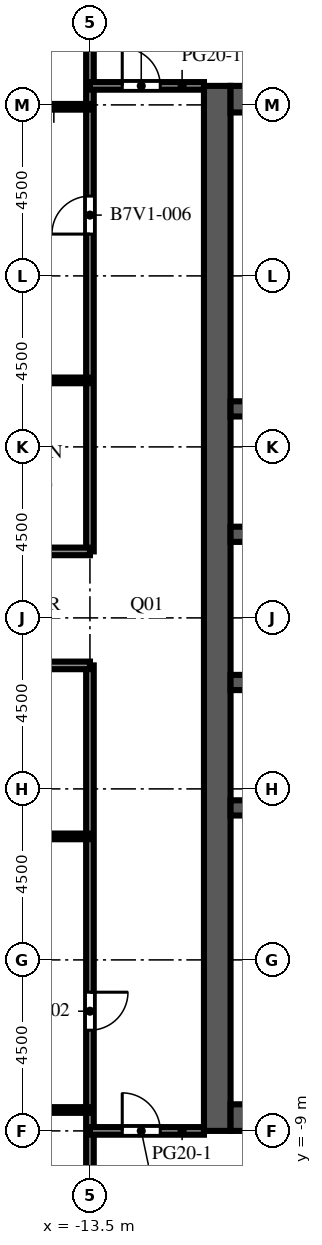
"""IFC4 building model, lengths in metres.
Left out: names, types, materials, properties, quantities, classifications, styles, units other than length and angle.
Written with IfcOpenShell. Run it as: python <this file> out.ifc"""

import sys

from ifc_helpers import new_model, si_unit, direction, frame, frame_2d, origin, place, context, subcontext, project, spatial, rectangle, extrude, element, fill, save


model = new_model("IFC4")
c1 = context("Model", 3, precision=1e-05, world=origin(), true_north=direction((0.0, 1.0)))
c2 = subcontext(c1, "Body", "Model", "MODEL_VIEW")
j1 = project(units=[si_unit("LENGTHUNIT", "METRE"), si_unit("PLANEANGLEUNIT", "RADIAN")], contexts=[c1])
p1 = place(None, origin())
s1 = spatial("IfcSite", under=j1, at=p1, CompositionType="ELEMENT")
p2 = place(p1, origin())
s2 = spatial("IfcBuilding", under=s1, at=p2, CompositionType="ELEMENT")
p3 = place(p2, frame((0.0, 0.0, 243.9)))
s3 = spatial("IfcBuildingStorey", under=s2, at=p3, CompositionType="ELEMENT", Elevation=243.9)
p4 = place(p3, frame((-10.15, -9.0, 0.0), z_axis=(0.0, 0.0, 1.0), x_axis=(0.0, 1.0, 0.0)))
e1 = element("IfcWall", 1, at=p4, inside=s3, PredefinedType="SHEAR", context=c2, shape_type="SweptSolid", body=[
    extrude(rectangle(XDim=27.5, YDim=0.7, at=frame_2d((13.75, 0.0))), origin(), (0.0, 0.0, 1.0), 4.1),
])
p5 = place(p4, frame((12.55, 0.0, 0.0)))
e2 = element("IfcOpeningElement", 2, at=p5, cuts=e1, PredefinedType="OPENING", context=c2, shape_type="SweptSolid", body=[
    extrude(rectangle(XDim=2.4, YDim=2.4, at=frame_2d((1.2, 1.2))), frame((0.0, 0.36, 0.0), z_axis=(0.0, -1.0, 0.0), x_axis=(1.0, 0.0, 0.0)), (0.0, 0.0, 1.0), 0.72),
])
p6 = place(p4, frame((6.825, 0.0, 0.0)))
e3 = element("IfcOpeningElement", 3, at=p6, cuts=e1, PredefinedType="OPENING", context=c2, shape_type="SweptSolid", body=[
    extrude(rectangle(XDim=1.2, YDim=2.1, at=frame_2d((0.6, 1.05))), frame((0.0, 0.36, 0.0), z_axis=(0.0, -1.0, 0.0), x_axis=(1.0, 0.0, 0.0)), (0.0, 0.0, 1.0), 0.72),
])
p7 = place(p4, frame((19.475, 0.0, 0.0)))
e4 = element("IfcOpeningElement", 4, at=p7, cuts=e1, PredefinedType="OPENING", context=c2, shape_type="SweptSolid", body=[
    extrude(rectangle(XDim=1.2, YDim=2.1, at=frame_2d((0.6, 1.05))), frame((0.0, 0.36, 0.0), z_axis=(0.0, -1.0, 0.0), x_axis=(1.0, 0.0, 0.0)), (0.0, 0.0, 1.0), 0.72),
])
for number, where, z_axis, x_axis in (
    (5, (-9.8, -8.65, 0.0), (0.0, 0.0, 1.0), (1.0, 0.0, 0.0)),
    (6, (-9.8, 18.15, 0.0), (0.0, 0.0, 1.0), (1.0, 0.0, 0.0)),
):
    element("IfcWall", number, at=place(p3, frame(where, z_axis=z_axis, x_axis=x_axis)), inside=s3, PredefinedType="SHEAR", context=c2, shape_type="SweptSolid", body=[
        extrude(rectangle(XDim=10.6, YDim=0.7, at=frame_2d((5.3, 0.0))), origin(), (0.0, 0.0, 1.0), 4.1),
    ])
p8 = place(p3, frame((-9.8, -0.5, 0.0), z_axis=(0.0, 0.0, 1.0), x_axis=(1.0, 0.0, 0.0)))
e7 = element("IfcWall", 7, at=p8, inside=s3, PredefinedType="SHEAR", context=c2, shape_type="SweptSolid", body=[
    extrude(rectangle(XDim=10.6, YDim=0.4, at=frame_2d((5.3, 0.0))), origin(), (0.0, 0.0, 1.0), 4.1),
])
p9 = place(p3, frame((-9.8, 2.8, 0.0), z_axis=(0.0, 0.0, 1.0), x_axis=(1.0, 0.0, 0.0)))
e8 = element("IfcWall", 8, at=p9, inside=s3, PredefinedType="SHEAR", context=c2, shape_type="SweptSolid", body=[
    extrude(rectangle(XDim=10.6, YDim=0.4, at=frame_2d((5.3, 0.0))), origin(), (0.0, 0.0, 1.0), 4.1),
])
p10 = place(p9, frame((0.688, 0.0, 0.0)))
e9 = element("IfcOpeningElement", 9, at=p10, cuts=e8, PredefinedType="OPENING", context=c2, shape_type="SweptSolid", body=[
    extrude(rectangle(XDim=1.1, YDim=2.1, at=frame_2d((0.55, 1.05))), frame((0.0, 0.21, 0.0), z_axis=(0.0, -1.0, 0.0), x_axis=(1.0, 0.0, 0.0)), (0.0, 0.0, 1.0), 0.42),
])
p11 = place(p9, frame((3.438, 0.0, 0.0)))
e10 = element("IfcOpeningElement", 10, at=p11, cuts=e8, PredefinedType="OPENING", context=c2, shape_type="SweptSolid", body=[
    extrude(rectangle(XDim=1.1, YDim=2.1, at=frame_2d((0.55, 1.05))), frame((0.0, 0.21, 0.0), z_axis=(0.0, -1.0, 0.0), x_axis=(1.0, 0.0, 0.0)), (0.0, 0.0, 1.0), 0.42),
])
p12 = place(p9, frame((6.113, 0.0, 0.0)))
e11 = element("IfcOpeningElement", 11, at=p12, cuts=e8, PredefinedType="OPENING", context=c2, shape_type="SweptSolid", body=[
    extrude(rectangle(XDim=1.0, YDim=2.1, at=frame_2d((0.5, 1.05))), frame((0.0, 0.21, 0.0), z_axis=(0.0, -1.0, 0.0), x_axis=(1.0, 0.0, 0.0)), (0.0, 0.0, 1.0), 0.42),
])
p13 = place(p9, frame((8.863, 0.0, 0.0)))
e12 = element("IfcOpeningElement", 12, at=p13, cuts=e8, PredefinedType="OPENING", context=c2, shape_type="SweptSolid", body=[
    extrude(rectangle(XDim=1.0, YDim=2.1, at=frame_2d((0.5, 1.05))), frame((0.0, 0.21, 0.0), z_axis=(0.0, -1.0, 0.0), x_axis=(1.0, 0.0, 0.0)), (0.0, 0.0, 1.0), 0.42),
])
p14 = place(p3, frame((-9.8, 6.7, 0.0), z_axis=(0.0, 0.0, 1.0), x_axis=(1.0, 0.0, 0.0)))
e13 = element("IfcWall", 13, at=p14, inside=s3, PredefinedType="SHEAR", context=c2, shape_type="SweptSolid", body=[
    extrude(rectangle(XDim=10.6, YDim=0.4, at=frame_2d((5.3, 0.0))), origin(), (0.0, 0.0, 1.0), 4.1),
])
p15 = place(p14, frame((3.438, 0.0, 0.0)))
e14 = element("IfcOpeningElement", 14, at=p15, cuts=e13, PredefinedType="OPENING", context=c2, shape_type="SweptSolid", body=[
    extrude(rectangle(XDim=1.1, YDim=2.1, at=frame_2d((0.55, 1.05))), frame((0.0, 0.21, 0.0), z_axis=(0.0, -1.0, 0.0), x_axis=(1.0, 0.0, 0.0)), (0.0, 0.0, 1.0), 0.42),
])
p16 = place(p14, frame((6.062, 0.0, 0.0)))
e15 = element("IfcOpeningElement", 15, at=p16, cuts=e13, PredefinedType="OPENING", context=c2, shape_type="SweptSolid", body=[
    extrude(rectangle(XDim=1.1, YDim=2.1, at=frame_2d((0.55, 1.05))), frame((0.0, 0.21, 0.0), z_axis=(0.0, -1.0, 0.0), x_axis=(1.0, 0.0, 0.0)), (0.0, 0.0, 1.0), 0.42),
])
p17 = place(p14, frame((8.812, 0.0, 0.0)))
e16 = element("IfcOpeningElement", 16, at=p17, cuts=e13, PredefinedType="OPENING", context=c2, shape_type="SweptSolid", body=[
    extrude(rectangle(XDim=1.1, YDim=2.1, at=frame_2d((0.55, 1.05))), frame((0.0, 0.21, 0.0), z_axis=(0.0, -1.0, 0.0), x_axis=(1.0, 0.0, 0.0)), (0.0, 0.0, 1.0), 0.42),
])
p18 = place(p14, frame((0.738, 0.0, 0.0)))
e17 = element("IfcOpeningElement", 17, at=p18, cuts=e13, PredefinedType="OPENING", context=c2, shape_type="SweptSolid", body=[
    extrude(rectangle(XDim=1.0, YDim=2.1, at=frame_2d((0.5, 1.05))), frame((0.0, 0.21, 0.0), z_axis=(0.0, -1.0, 0.0), x_axis=(1.0, 0.0, 0.0)), (0.0, 0.0, 1.0), 0.42),
])
p19 = place(p3, frame((-9.8, 10.0, 0.0), z_axis=(0.0, 0.0, 1.0), x_axis=(1.0, 0.0, 0.0)))
e18 = element("IfcWall", 18, at=p19, inside=s3, PredefinedType="SHEAR", context=c2, shape_type="SweptSolid", body=[
    extrude(rectangle(XDim=10.6, YDim=0.4, at=frame_2d((5.3, 0.0))), origin(), (0.0, 0.0, 1.0), 4.1),
])
p20 = place(p3, frame((-13.5, -22.077, 0.0), z_axis=(0.0, 0.0, 1.0), x_axis=(0.0, 1.0, 0.0)))
e19 = element("IfcWall", 19, at=p20, inside=s3, PredefinedType="PARTITIONING", context=c2, shape_type="SweptSolid", body=[
    extrude(rectangle(XDim=25.327, YDim=0.2, at=frame_2d((12.664, 0.0))), origin(), (0.0, 0.0, 1.0), 3.65),
])
p21 = place(p20, frame((15.727, 0.0, 0.0)))
e20 = element("IfcOpeningElement", 20, at=p21, cuts=e19, PredefinedType="OPENING", context=c2, shape_type="SweptSolid", body=[
    extrude(rectangle(XDim=1.0, YDim=2.1, at=frame_2d((0.5, 1.05))), frame((0.0, 0.11, 0.0), z_axis=(0.0, -1.0, 0.0), x_axis=(1.0, 0.0, 0.0)), (0.0, 0.0, 1.0), 0.22),
])
p22 = place(p3, frame((-13.5, 6.25, 0.0), z_axis=(0.0, 0.0, 1.0), x_axis=(0.0, 1.0, 0.0)))
e21 = element("IfcWall", 21, at=p22, inside=s3, PredefinedType="PARTITIONING", context=c2, shape_type="SweptSolid", body=[
    extrude(rectangle(XDim=24.827, YDim=0.2, at=frame_2d((12.414, 0.0))), origin(), (0.0, 0.0, 1.0), 3.65),
])
p23 = place(p22, frame((8.35, 0.0, 0.0)))
e22 = element("IfcOpeningElement", 22, at=p23, cuts=e21, PredefinedType="OPENING", context=c2, shape_type="SweptSolid", body=[
    extrude(rectangle(XDim=1.0, YDim=2.1, at=frame_2d((0.5, 1.05))), frame((0.0, 0.11, 0.0), z_axis=(0.0, -1.0, 0.0), x_axis=(1.0, 0.0, 0.0)), (0.0, 0.0, 1.0), 0.22),
])
p24 = place(p3, frame((-10.5, -9.0, 0.0), z_axis=(0.0, 0.0, 1.0), x_axis=(-1.0, 0.0, 0.0)))
e23 = element("IfcWall", 23, at=p24, inside=s3, PredefinedType="PARTITIONING", context=c2, shape_type="SweptSolid", body=[
    extrude(rectangle(XDim=3.0, YDim=0.2, at=frame_2d((1.5, 0.0))), origin(), (0.0, 0.0, 1.0), 3.65),
])
p25 = place(p24, frame((1.15, 0.0, 0.0)))
e24 = element("IfcOpeningElement", 24, at=p25, cuts=e23, PredefinedType="OPENING", context=c2, shape_type="SweptSolid", body=[
    extrude(rectangle(XDim=1.0, YDim=2.1, at=frame_2d((0.5, 1.05))), frame((0.0, 0.11, 0.0), z_axis=(0.0, -1.0, 0.0), x_axis=(1.0, 0.0, 0.0)), (0.0, 0.0, 1.0), 0.22),
])
p26 = place(p3, frame((-13.5, -8.45, 0.0), z_axis=(0.0, 0.0, 1.0), x_axis=(-1.0, 0.0, 0.0)))
e25 = element("IfcWall", 25, at=p26, inside=s3, PredefinedType="PARTITIONING", context=c2, shape_type="SweptSolid", body=[
    extrude(rectangle(XDim=4.35, YDim=0.15, at=frame_2d((2.175, 0.0))), origin(), (0.0, 0.0, 1.0), 3.65),
])
p27 = place(p26, frame((2.15, 0.0, 0.0)))
e26 = element("IfcOpeningElement", 26, at=p27, cuts=e25, PredefinedType="OPENING", context=c2, shape_type="SweptSolid", body=[
    extrude(rectangle(XDim=1.0, YDim=2.1, at=frame_2d((0.5, 1.05))), frame((0.0, 0.085, 0.0), z_axis=(0.0, -1.0, 0.0), x_axis=(1.0, 0.0, 0.0)), (0.0, 0.0, 1.0), 0.17),
])
p28 = place(p3, frame((-17.85, -1.25, 0.0), z_axis=(0.0, 0.0, 1.0), x_axis=(1.0, 0.0, 0.0)))
e27 = element("IfcWall", 27, at=p28, inside=s3, PredefinedType="PARTITIONING", context=c2, shape_type="SweptSolid", body=[
    extrude(rectangle(XDim=4.35, YDim=0.15, at=frame_2d((2.175, 0.0))), origin(), (0.0, 0.0, 1.0), 3.65),
])
p29 = place(p28, frame((1.7, 0.0, 0.0)))
e28 = element("IfcOpeningElement", 28, at=p29, cuts=e27, PredefinedType="OPENING", context=c2, shape_type="SweptSolid", body=[
    extrude(rectangle(XDim=1.0, YDim=2.1, at=frame_2d((0.5, 1.05))), frame((0.0, 0.085, 0.0), z_axis=(0.0, -1.0, 0.0), x_axis=(1.0, 0.0, 0.0)), (0.0, 0.0, 1.0), 0.17),
])
for number, where, z_axis, x_axis in (
    (29, (-17.85, 3.25, 0.0), (0.0, 0.0, 1.0), (1.0, 0.0, 0.0)),
    (30, (-17.85, 6.25, 0.0), (0.0, 0.0, 1.0), (1.0, 0.0, 0.0)),
):
    element("IfcWall", number, at=place(p3, frame(where, z_axis=z_axis, x_axis=x_axis)), inside=s3, PredefinedType="PARTITIONING", context=c2, shape_type="SweptSolid", body=[
        extrude(rectangle(XDim=4.35, YDim=0.2, at=frame_2d((2.175, 0.0))), origin(), (0.0, 0.0, 1.0), 3.65),
    ])
p30 = place(p3, frame((-13.5, 10.75, 0.0), z_axis=(0.0, 0.0, 1.0), x_axis=(-1.0, 0.0, 0.0)))
e31 = element("IfcWall", 31, at=p30, inside=s3, PredefinedType="PARTITIONING", context=c2, shape_type="SweptSolid", body=[
    extrude(rectangle(XDim=4.35, YDim=0.15, at=frame_2d((2.175, 0.0))), origin(), (0.0, 0.0, 1.0), 3.65),
])
p31 = place(p30, frame((1.65, 0.0, 0.0)))
e32 = element("IfcOpeningElement", 32, at=p31, cuts=e31, PredefinedType="OPENING", context=c2, shape_type="SweptSolid", body=[
    extrude(rectangle(XDim=1.0, YDim=2.1, at=frame_2d((0.5, 1.05))), frame((0.0, 0.085, 0.0), z_axis=(0.0, -1.0, 0.0), x_axis=(1.0, 0.0, 0.0)), (0.0, 0.0, 1.0), 0.17),
])
p32 = place(p3, frame((-17.6, 17.95, 0.0), z_axis=(0.0, 0.0, 1.0), x_axis=(1.0, 0.0, 0.0)))
e33 = element("IfcWall", 33, at=p32, inside=s3, PredefinedType="PARTITIONING", context=c2, shape_type="SweptSolid", body=[
    extrude(rectangle(XDim=4.1, YDim=0.15, at=frame_2d((2.05, 0.0))), origin(), (0.0, 0.0, 1.0), 3.65),
])
p33 = place(p32, frame((1.2, 0.0, 0.0)))
e34 = element("IfcOpeningElement", 34, at=p33, cuts=e33, PredefinedType="OPENING", context=c2, shape_type="SweptSolid", body=[
    extrude(rectangle(XDim=1.0, YDim=2.1, at=frame_2d((0.5, 1.05))), frame((0.0, 0.085, 0.0), z_axis=(0.0, -1.0, 0.0), x_axis=(1.0, 0.0, 0.0)), (0.0, 0.0, 1.0), 0.17),
])
p34 = place(p3, frame((-13.5, 18.5, 0.0), z_axis=(0.0, 0.0, 1.0), x_axis=(1.0, 0.0, 0.0)))
e35 = element("IfcWall", 35, at=p34, inside=s3, PredefinedType="PARTITIONING", context=c2, shape_type="SweptSolid", body=[
    extrude(rectangle(XDim=3.0, YDim=0.2, at=frame_2d((1.5, 0.0))), origin(), (0.0, 0.0, 1.0), 3.65),
])
p35 = place(p34, frame((0.85, 0.0, 0.0)))
e36 = element("IfcOpeningElement", 36, at=p35, cuts=e35, PredefinedType="OPENING", context=c2, shape_type="SweptSolid", body=[
    extrude(rectangle(XDim=1.0, YDim=2.1, at=frame_2d((0.5, 1.05))), frame((0.0, 0.11, 0.0), z_axis=(0.0, -1.0, 0.0), x_axis=(1.0, 0.0, 0.0)), (0.0, 0.0, 1.0), 0.22),
])
p36 = place(p5, origin())
e37 = element("IfcDoor", 37, at=p36, inside=s3, OperationType="DOUBLE_DOOR_DOUBLE_SWING", PredefinedType="DOOR", context=c2, shape_type="SweptSolid", body=[
    extrude(rectangle(XDim=2.4, YDim=2.4, at=frame_2d((1.2, 1.2))), frame((0.0, 0.025, 0.0), z_axis=(0.0, -1.0, 0.0), x_axis=(1.0, 0.0, 0.0)), (0.0, 0.0, 1.0), 0.05),
])
fill(e2, e37)
p37 = place(p6, origin())
e38 = element("IfcDoor", 38, at=p37, inside=s3, OperationType="SINGLE_SWING_LEFT", PredefinedType="DOOR", context=c2, shape_type="SweptSolid", body=[
    extrude(rectangle(XDim=1.2, YDim=2.1, at=frame_2d((0.6, 1.05))), frame((0.0, 0.025, 0.0), z_axis=(0.0, -1.0, 0.0), x_axis=(1.0, 0.0, 0.0)), (0.0, 0.0, 1.0), 0.05),
])
fill(e3, e38)
p38 = place(p7, origin())
e39 = element("IfcDoor", 39, at=p38, inside=s3, OperationType="SINGLE_SWING_LEFT", PredefinedType="DOOR", context=c2, shape_type="SweptSolid", body=[
    extrude(rectangle(XDim=1.2, YDim=2.1, at=frame_2d((0.6, 1.05))), frame((0.0, 0.025, 0.0), z_axis=(0.0, -1.0, 0.0), x_axis=(1.0, 0.0, 0.0)), (0.0, 0.0, 1.0), 0.05),
])
fill(e4, e39)
p39 = place(p21, origin())
e40 = element("IfcDoor", 40, at=p39, inside=s3, OperationType="SINGLE_SWING_RIGHT", PredefinedType="DOOR", context=c2, shape_type="SweptSolid", body=[
    extrude(rectangle(XDim=1.0, YDim=2.1, at=frame_2d((0.5, 1.05))), frame((0.0, 0.025, 0.0), z_axis=(0.0, -1.0, 0.0), x_axis=(1.0, 0.0, 0.0)), (0.0, 0.0, 1.0), 0.05),
])
fill(e20, e40)
p40 = place(p23, origin())
e41 = element("IfcDoor", 41, at=p40, inside=s3, OperationType="SINGLE_SWING_LEFT", PredefinedType="DOOR", context=c2, shape_type="SweptSolid", body=[
    extrude(rectangle(XDim=1.0, YDim=2.1, at=frame_2d((0.5, 1.05))), frame((0.0, 0.025, 0.0), z_axis=(0.0, -1.0, 0.0), x_axis=(1.0, 0.0, 0.0)), (0.0, 0.0, 1.0), 0.05),
])
fill(e22, e41)
p41 = place(p25, origin())
e42 = element("IfcDoor", 42, at=p41, inside=s3, OperationType="SINGLE_SWING_RIGHT", PredefinedType="DOOR", context=c2, shape_type="SweptSolid", body=[
    extrude(rectangle(XDim=1.0, YDim=2.1, at=frame_2d((0.5, 1.05))), frame((0.0, 0.025, 0.0), z_axis=(0.0, -1.0, 0.0), x_axis=(1.0, 0.0, 0.0)), (0.0, 0.0, 1.0), 0.05),
])
fill(e24, e42)
p42 = place(p35, origin())
e43 = element("IfcDoor", 43, at=p42, inside=s3, OperationType="SINGLE_SWING_LEFT", PredefinedType="DOOR", context=c2, shape_type="SweptSolid", body=[
    extrude(rectangle(XDim=1.0, YDim=2.1, at=frame_2d((0.5, 1.05))), frame((0.0, 0.025, 0.0), z_axis=(0.0, -1.0, 0.0), x_axis=(1.0, 0.0, 0.0)), (0.0, 0.0, 1.0), 0.05),
])
fill(e36, e43)
save(model, sys.argv[1])
